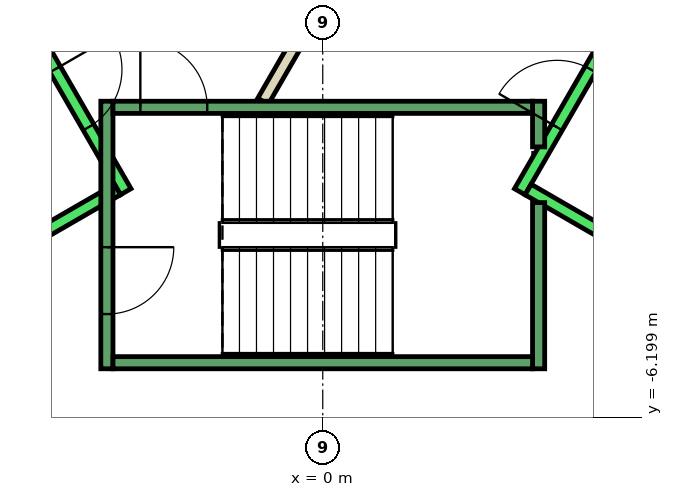
"""IFC4 building model, lengths in metres.
Left out: names, types, materials, properties, quantities, classifications, styles, units other than length and angle.
Written with IfcOpenShell. Run it as: python <this file> out.ifc"""

import sys

from ifc_helpers import new_model, si_unit, direction, frame, frame_2d, origin, place, context, subcontext, project, spatial, rectangle, extrude, element, fill, save


model = new_model("IFC4")
c1 = context("Model", 3, precision=1e-05, world=origin(), true_north=direction((0.0, 1.0)))
c2 = subcontext(c1, "Body", "Model", "MODEL_VIEW")
j1 = project(units=[si_unit("LENGTHUNIT", "METRE"), si_unit("PLANEANGLEUNIT", "RADIAN")], contexts=[c1])
p1 = place(None, origin())
s1 = spatial("IfcSite", under=j1, at=p1, CompositionType="ELEMENT")
p2 = place(p1, origin())
s2 = spatial("IfcBuilding", under=s1, at=p2, CompositionType="ELEMENT")
p3 = place(p2, frame((0.0, 0.0, 245.0)))
s3 = spatial("IfcBuildingStorey", under=s2, at=p3, CompositionType="ELEMENT", Elevation=245.0)
p4 = place(p3, frame((-0.982, -1.0, 0.0), z_axis=(0.0, 0.0, 1.0), x_axis=(0.50024047865, 0.865886518847, 0.0)))
e1 = element("IfcWall", 1, at=p4, inside=s3, PredefinedType="PARTITIONING", context=c2, shape_type="SweptSolid", body=[
    extrude(rectangle(XDim=1.863, YDim=0.2, at=frame_2d((0.931, 0.0))), origin(), (0.0, 0.0, 1.0), 3.26),
])
p5 = place(p3, frame((-5.94, 2.188, 0.0), z_axis=(0.0, 0.0, 1.0), x_axis=(0.500034260056, -0.866005622828, 0.0)))
e2 = element("IfcWall", 2, at=p5, inside=s3, PredefinedType="STANDARD", context=c2, shape_type="SweptSolid", body=[
    extrude(rectangle(XDim=5.399, YDim=0.2, at=frame_2d((2.7, 0.0))), origin(), (0.0, 0.0, 1.0), 3.26),
])
p6 = place(p5, frame((3.075, 0.0, 0.0)))
e3 = element("IfcOpeningElement", 3, at=p6, cuts=e2, PredefinedType="OPENING", context=c2, shape_type="SweptSolid", body=[
    extrude(rectangle(XDim=1.1, YDim=2.1, at=frame_2d((0.55, 1.05))), frame((0.0, 0.11, 0.0), z_axis=(0.0, -1.0, 0.0), x_axis=(1.0, 0.0, 0.0)), (0.0, 0.0, 1.0), 0.22),
])
p7 = place(p5, frame((1.225, 0.0, 0.0)))
e4 = element("IfcOpeningElement", 4, at=p7, cuts=e2, PredefinedType="OPENING", context=c2, shape_type="SweptSolid", body=[
    extrude(rectangle(XDim=1.1, YDim=2.1, at=frame_2d((0.55, 1.05))), frame((0.0, 0.11, 0.0), z_axis=(0.0, -1.0, 0.0), x_axis=(1.0, 0.0, 0.0)), (0.0, 0.0, 1.0), 0.22),
])
p8 = place(p3, frame((-3.377, -2.452, 0.0), z_axis=(0.0, 0.0, 1.0), x_axis=(-0.865955154139, -0.50012165622, 0.0)))
e5 = element("IfcWall", 5, at=p8, inside=s3, PredefinedType="STANDARD", context=c2, shape_type="SweptSolid", body=[
    extrude(rectangle(XDim=2.4, YDim=0.2, at=frame_2d((1.2, 0.0))), origin(), (0.0, 0.0, 1.0), 3.26),
])
p9 = place(p3, frame((3.24, -2.488, 0.0), z_axis=(0.0, 0.0, 1.0), x_axis=(0.500034260056, 0.866005622828, 0.0)))
e6 = element("IfcWall", 6, at=p9, inside=s3, PredefinedType="STANDARD", context=c2, shape_type="SweptSolid", body=[
    extrude(rectangle(XDim=5.399, YDim=0.2, at=frame_2d((2.7, 0.0))), origin(), (0.0, 0.0, 1.0), 3.26),
])
p10 = place(p9, frame((3.225, 0.0, 0.0)))
e7 = element("IfcOpeningElement", 7, at=p10, cuts=e6, PredefinedType="OPENING", context=c2, shape_type="SweptSolid", body=[
    extrude(rectangle(XDim=1.1, YDim=2.1, at=frame_2d((0.55, 1.05))), frame((0.0, 0.11, 0.0), z_axis=(0.0, -1.0, 0.0), x_axis=(1.0, 0.0, 0.0)), (0.0, 0.0, 1.0), 0.22),
])
p11 = place(p9, frame((1.225, 0.0, 0.0)))
e8 = element("IfcOpeningElement", 8, at=p11, cuts=e6, PredefinedType="OPENING", context=c2, shape_type="SweptSolid", body=[
    extrude(rectangle(XDim=1.1, YDim=2.1, at=frame_2d((0.55, 1.05))), frame((0.0, 0.11, 0.0), z_axis=(0.0, -1.0, 0.0), x_axis=(1.0, 0.0, 0.0)), (0.0, 0.0, 1.0), 0.22),
])
p12 = place(p3, frame((3.377, -2.452, 0.0), z_axis=(0.0, 0.0, 1.0), x_axis=(0.865955154139, -0.50012165622, 0.0)))
e9 = element("IfcWall", 9, at=p12, inside=s3, PredefinedType="STANDARD", context=c2, shape_type="SweptSolid", body=[
    extrude(rectangle(XDim=2.4, YDim=0.2, at=frame_2d((1.2, 0.0))), origin(), (0.0, 0.0, 1.0), 3.26),
])
p13 = place(p3, frame((-3.55, -1.0, 0.0), z_axis=(0.0, 0.0, 1.0), x_axis=(0.0, -1.0, 0.0)))
e10 = element("IfcWall", 10, at=p13, inside=s3, PredefinedType="STANDARD", context=c2, shape_type="SweptSolid", body=[
    extrude(rectangle(XDim=4.4, YDim=0.2, at=frame_2d((2.2, 0.0))), origin(), (0.0, 0.0, 1.0), 3.26),
])
p14 = place(p13, frame((2.4, 0.0, 0.0)))
e11 = element("IfcOpeningElement", 11, at=p14, cuts=e10, PredefinedType="OPENING", context=c2, shape_type="SweptSolid", body=[
    extrude(rectangle(XDim=1.1, YDim=2.2, at=frame_2d((0.55, 1.1))), frame((0.0, 0.11, 0.0), z_axis=(0.0, -1.0, 0.0), x_axis=(1.0, 0.0, 0.0)), (0.0, 0.0, 1.0), 0.22),
])
p15 = place(p3, frame((3.55, -2.667, 0.0), z_axis=(0.0, 0.0, 1.0), x_axis=(0.0, -1.0, 0.0)))
e12 = element("IfcWall", 12, at=p15, inside=s3, PredefinedType="STANDARD", context=c2, shape_type="SweptSolid", body=[
    extrude(rectangle(XDim=2.733, YDim=0.2, at=frame_2d((1.366, 0.0))), origin(), (0.0, 0.0, 1.0), 3.26),
])
p16 = place(p3, frame((3.55, -1.0, 0.0), z_axis=(0.0, 0.0, 1.0), x_axis=(0.0, -1.0, 0.0)))
e13 = element("IfcWall", 13, at=p16, inside=s3, PredefinedType="STANDARD", context=c2, shape_type="SweptSolid", body=[
    extrude(rectangle(XDim=0.751, YDim=0.2, at=frame_2d((0.375, 0.0))), origin(), (0.0, 0.0, 1.0), 3.26),
])
p17 = place(p3, frame((-3.45, -1.1, 0.0), z_axis=(0.0, 0.0, 1.0), x_axis=(1.0, 0.0, 0.0)))
e14 = element("IfcWall", 14, at=p17, inside=s3, PredefinedType="STANDARD", context=c2, shape_type="SweptSolid", body=[
    extrude(rectangle(XDim=6.9, YDim=0.2, at=frame_2d((3.45, 0.0))), origin(), (0.0, 0.0, 1.0), 3.26),
])
p18 = place(p17, frame((0.45, 0.0, 0.0)))
e15 = element("IfcOpeningElement", 15, at=p18, cuts=e14, PredefinedType="OPENING", context=c2, shape_type="SweptSolid", body=[
    extrude(rectangle(XDim=1.1, YDim=2.2, at=frame_2d((0.55, 1.1))), frame((0.0, 0.11, 0.0), z_axis=(0.0, -1.0, 0.0), x_axis=(1.0, 0.0, 0.0)), (0.0, 0.0, 1.0), 0.22),
])
p19 = place(p3, frame((-3.45, -5.3, 0.0), z_axis=(0.0, 0.0, 1.0), x_axis=(1.0, 0.0, 0.0)))
e16 = element("IfcWall", 16, at=p19, inside=s3, PredefinedType="STANDARD", context=c2, shape_type="SweptSolid", body=[
    extrude(rectangle(XDim=6.9, YDim=0.2, at=frame_2d((3.45, 0.0))), origin(), (0.0, 0.0, 1.0), 3.26),
])
p20 = place(p6, origin())
e17 = element("IfcDoor", 17, at=p20, inside=s3, OperationType="SLIDING_TO_LEFT", PredefinedType="DOOR", context=c2, shape_type="SweptSolid", body=[
    extrude(rectangle(XDim=1.1, YDim=2.1, at=frame_2d((0.55, 1.05))), frame((0.0, 0.025, 0.0), z_axis=(0.0, -1.0, 0.0), x_axis=(1.0, 0.0, 0.0)), (0.0, 0.0, 1.0), 0.05),
])
fill(e3, e17)
p21 = place(p11, origin())
e18 = element("IfcDoor", 18, at=p21, inside=s3, OperationType="SLIDING_TO_LEFT", PredefinedType="DOOR", context=c2, shape_type="SweptSolid", body=[
    extrude(rectangle(XDim=1.1, YDim=2.1, at=frame_2d((0.55, 1.05))), frame((0.0, 0.025, 0.0), z_axis=(0.0, -1.0, 0.0), x_axis=(1.0, 0.0, 0.0)), (0.0, 0.0, 1.0), 0.05),
])
fill(e8, e18)
p22 = place(p18, origin())
e19 = element("IfcDoor", 19, at=p22, inside=s3, OperationType="SINGLE_SWING_LEFT", PredefinedType="DOOR", context=c2, shape_type="SweptSolid", body=[
    extrude(rectangle(XDim=1.1, YDim=2.2, at=frame_2d((0.55, 1.1))), frame((0.0, 0.025, 0.0), z_axis=(0.0, -1.0, 0.0), x_axis=(1.0, 0.0, 0.0)), (0.0, 0.0, 1.0), 0.05),
])
fill(e15, e19)
p23 = place(p14, origin())
e20 = element("IfcDoor", 20, at=p23, inside=s3, OperationType="SINGLE_SWING_LEFT", PredefinedType="DOOR", context=c2, shape_type="SweptSolid", body=[
    extrude(rectangle(XDim=1.1, YDim=2.2, at=frame_2d((0.55, 1.1))), frame((0.0, 0.025, 0.0), z_axis=(0.0, -1.0, 0.0), x_axis=(1.0, 0.0, 0.0)), (0.0, 0.0, 1.0), 0.05),
])
fill(e11, e20)
save(model, sys.argv[1])
